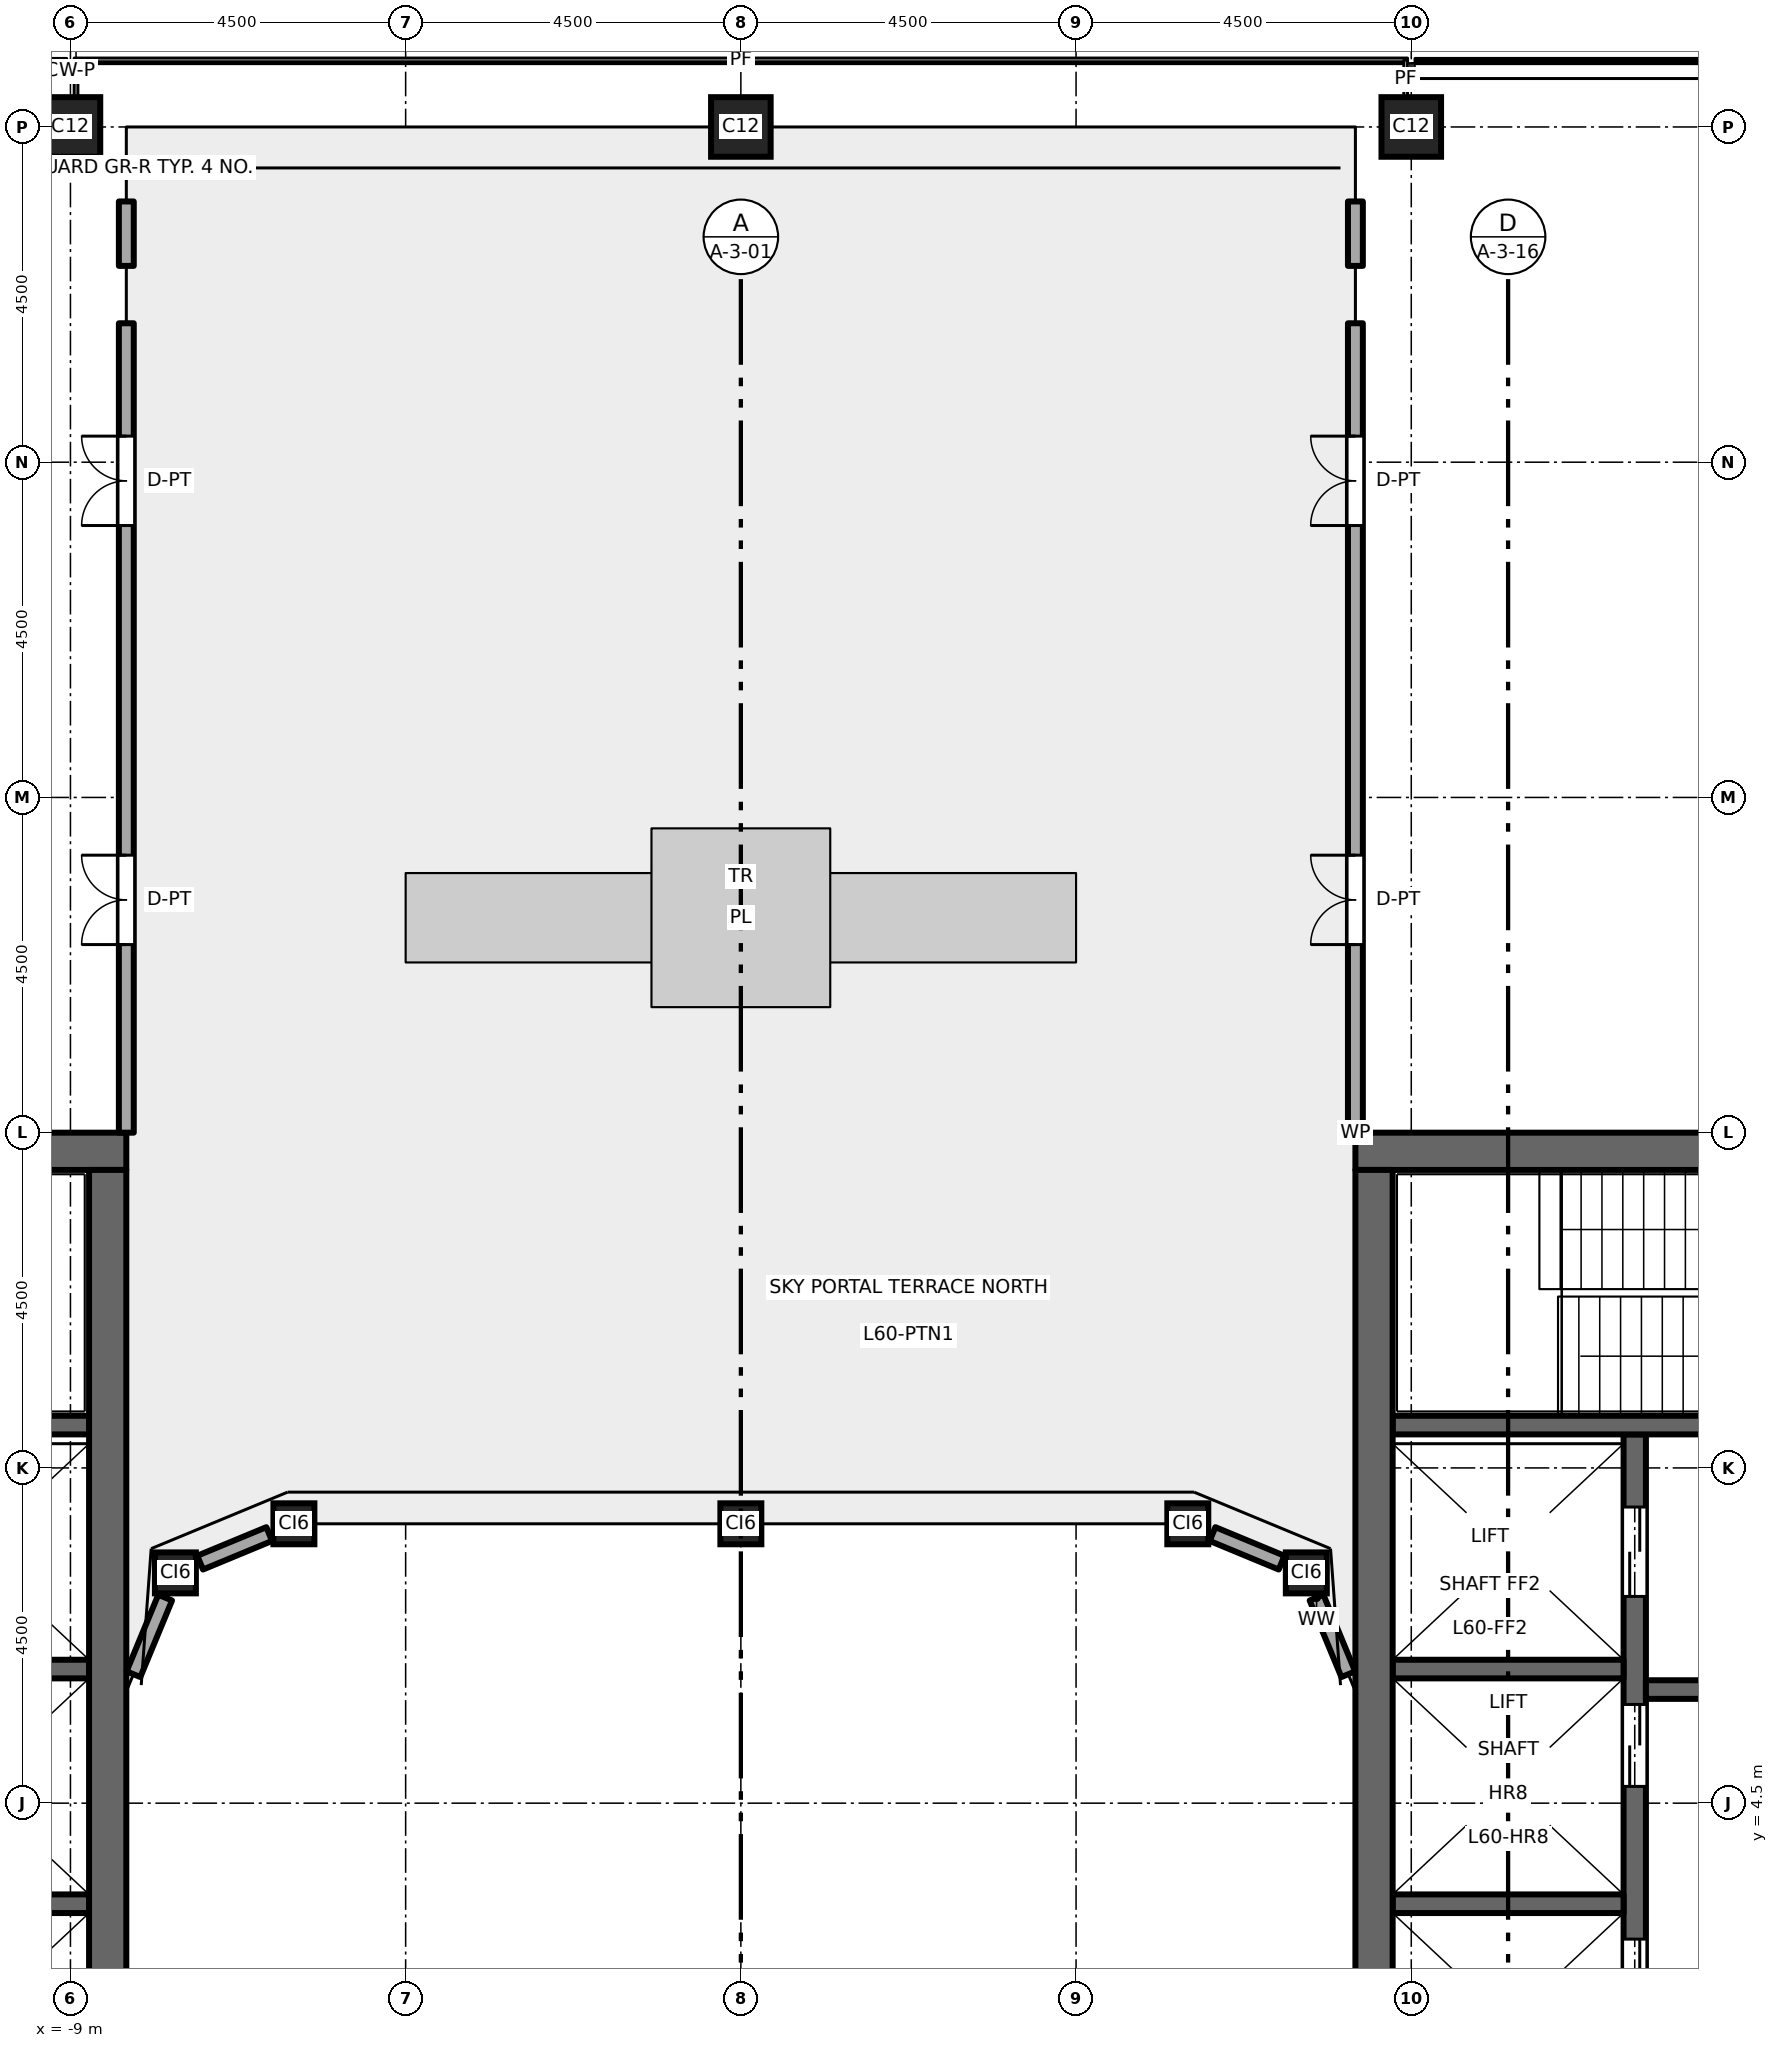
"""IFC4 building model, lengths in metres.
Left out: names, types, materials, properties, quantities, classifications, styles, units other than length and angle.
Written with IfcOpenShell. Run it as: python <this file> out.ifc"""

import sys

from ifc_helpers import new_model, si_unit, direction, frame, frame_2d, origin, origin_2d, place, context, subcontext, project, spatial, rectangle, hollow_rectangle, extrude, element, fill, save


model = new_model("IFC4")
c1 = context("Model", 3, precision=1e-05, world=origin(), true_north=direction((0.0, 1.0)))
c2 = subcontext(c1, "Body", "Model", "MODEL_VIEW")
j1 = project(units=[si_unit("LENGTHUNIT", "METRE"), si_unit("PLANEANGLEUNIT", "RADIAN")], contexts=[c1])
p1 = place(None, origin())
s1 = spatial("IfcSite", under=j1, at=p1, CompositionType="ELEMENT")
p2 = place(p1, origin())
s2 = spatial("IfcBuilding", under=s1, at=p2, CompositionType="ELEMENT")
p3 = place(p2, frame((0.0, 0.0, 278.2)))
s3 = spatial("IfcBuildingStorey", under=s2, at=p3, CompositionType="ELEMENT", Elevation=278.2)
for number, where, z_axis, x_axis in (
    (1, (9.0, 27.0, 0.0), (0.0, 0.0, 1.0), (1.0, 0.0, 0.0)),
    (2, (0.0, 27.0, 0.0), (0.0, 0.0, 1.0), (1.0, 0.0, 0.0)),
    (3, (-9.0, 27.0, 0.0), (0.0, 0.0, 1.0), (1.0, 0.0, 0.0)),
):
    element("IfcColumn", number, at=place(p3, frame(where, z_axis=z_axis, x_axis=x_axis)), inside=s3, PredefinedType="COLUMN", context=c2, shape_type="SweptSolid", body=[
        extrude(hollow_rectangle(XDim=0.8, YDim=0.8, WallThickness=0.045, at=origin_2d()), origin(), (0.0, 0.0, 1.0), 6.0),
    ])
for number, where, z_axis, x_axis in (
    (4, (-7.591, 7.591, 0.0), (0.0, 0.0, 1.0), (1.0, 0.0, 0.0)),
    (5, (-6.0, 8.25, 0.0), (0.0, 0.0, 1.0), (1.0, 0.0, 0.0)),
    (6, (0.0, 8.25, 0.0), (0.0, 0.0, 1.0), (1.0, 0.0, 0.0)),
    (7, (6.0, 8.25, 0.0), (0.0, 0.0, 1.0), (1.0, 0.0, 0.0)),
    (8, (7.591, 7.591, 0.0), (0.0, 0.0, 1.0), (1.0, 0.0, 0.0)),
):
    element("IfcColumn", number, at=place(p3, frame(where, z_axis=z_axis, x_axis=x_axis)), inside=s3, PredefinedType="COLUMN", context=c2, shape_type="SweptSolid", body=[
        extrude(hollow_rectangle(XDim=0.55, YDim=0.55, WallThickness=0.028, at=origin_2d()), origin(), (0.0, 0.0, 1.0), 6.0),
    ])
for number, where, z_axis, x_axis in (
    (9, (-8.75, 3.15, 0.0), (0.0, 0.0, 1.0), (-1.0, 0.0, 0.0)),
    (10, (-8.75, 6.3, 0.0), (0.0, 0.0, 1.0), (-1.0, 0.0, 0.0)),
):
    element("IfcWall", number, at=place(p3, frame(where, z_axis=z_axis, x_axis=x_axis)), inside=s3, PredefinedType="SHEAR", context=c2, shape_type="SweptSolid", body=[
        extrude(rectangle(XDim=3.1, YDim=0.25, at=frame_2d((1.55, 0.0))), origin(), (0.0, 0.0, 1.0), 5.8),
    ])
p4 = place(p3, frame((-8.75, 9.575, 0.0), z_axis=(0.0, 0.0, 1.0), x_axis=(-1.0, 0.0, 0.0)))
e11 = element("IfcWall", 11, at=p4, inside=s3, PredefinedType="SHEAR", context=c2, shape_type="SweptSolid", body=[
    extrude(rectangle(XDim=8.0, YDim=0.25, at=frame_2d((4.0, 0.0))), origin(), (0.0, 0.0, 1.0), 5.8),
])
p5 = place(p4, frame((6.65, 0.0, 0.0)))
e12 = element("IfcOpeningElement", 12, at=p5, cuts=e11, PredefinedType="OPENING", context=c2, shape_type="SweptSolid", body=[
    extrude(rectangle(XDim=1.1, YDim=2.1, at=frame_2d((0.55, 1.05))), frame((0.0, 0.135, 0.0), z_axis=(0.0, -1.0, 0.0), x_axis=(1.0, 0.0, 0.0)), (0.0, 0.0, 1.0), 0.27),
])
p6 = place(p3, frame((-8.25, 13.25, 0.0), z_axis=(0.0, 0.0, 1.0), x_axis=(-1.0, 0.0, 0.0)))
e13 = element("IfcWall", 13, at=p6, inside=s3, PredefinedType="SHEAR", context=c2, shape_type="SweptSolid", body=[
    extrude(rectangle(XDim=13.5, YDim=0.5, at=frame_2d((6.75, 0.0))), origin(), (0.0, 0.0, 1.0), 5.8),
])
p7 = place(p3, frame((-8.5, -13.0, 0.0), z_axis=(0.0, 0.0, 1.0), x_axis=(0.0, 1.0, 0.0)))
e14 = element("IfcWall", 14, at=p7, inside=s3, PredefinedType="SHEAR", context=c2, shape_type="SweptSolid", body=[
    extrude(rectangle(XDim=26.0, YDim=0.5, at=frame_2d((13.0, 0.0))), origin(), (0.0, 0.0, 1.0), 5.8),
])
p8 = place(p3, frame((12.0, -9.45, 0.0), z_axis=(0.0, 0.0, 1.0), x_axis=(0.0, 1.0, 0.0)))
e15 = element("IfcWall", 15, at=p8, inside=s3, PredefinedType="SHEAR", context=c2, shape_type="SweptSolid", body=[
    extrude(rectangle(XDim=18.9, YDim=0.3, at=frame_2d((9.45, 0.0))), origin(), (0.0, 0.0, 1.0), 5.8),
])
p9 = place(p8, frame((4.725, 0.0, 0.0)))
e16 = element("IfcOpeningElement", 16, at=p9, cuts=e15, PredefinedType="OPENING", context=c2, shape_type="SweptSolid", body=[
    extrude(rectangle(XDim=1.1, YDim=2.1, at=frame_2d((0.55, 1.05))), frame((0.0, 0.16, 0.0), z_axis=(0.0, -1.0, 0.0), x_axis=(1.0, 0.0, 0.0)), (0.0, 0.0, 1.0), 0.32),
])
p10 = place(p8, frame((7.875, 0.0, 0.0)))
e17 = element("IfcOpeningElement", 17, at=p10, cuts=e15, PredefinedType="OPENING", context=c2, shape_type="SweptSolid", body=[
    extrude(rectangle(XDim=1.1, YDim=2.1, at=frame_2d((0.55, 1.05))), frame((0.0, 0.16, 0.0), z_axis=(0.0, -1.0, 0.0), x_axis=(1.0, 0.0, 0.0)), (0.0, 0.0, 1.0), 0.32),
])
p11 = place(p8, frame((11.025, 0.0, 0.0)))
e18 = element("IfcOpeningElement", 18, at=p11, cuts=e15, PredefinedType="OPENING", context=c2, shape_type="SweptSolid", body=[
    extrude(rectangle(XDim=1.1, YDim=2.1, at=frame_2d((0.55, 1.05))), frame((0.0, 0.16, 0.0), z_axis=(0.0, -1.0, 0.0), x_axis=(1.0, 0.0, 0.0)), (0.0, 0.0, 1.0), 0.32),
])
p12 = place(p8, frame((14.175, 0.0, 0.0)))
e19 = element("IfcOpeningElement", 19, at=p12, cuts=e15, PredefinedType="OPENING", context=c2, shape_type="SweptSolid", body=[
    extrude(rectangle(XDim=1.1, YDim=2.1, at=frame_2d((0.55, 1.05))), frame((0.0, 0.16, 0.0), z_axis=(0.0, -1.0, 0.0), x_axis=(1.0, 0.0, 0.0)), (0.0, 0.0, 1.0), 0.32),
])
p13 = place(p8, frame((16.725, 0.0, 0.0)))
e20 = element("IfcOpeningElement", 20, at=p13, cuts=e15, PredefinedType="OPENING", context=c2, shape_type="SweptSolid", body=[
    extrude(rectangle(XDim=1.2, YDim=2.1, at=frame_2d((0.6, 1.05))), frame((0.0, 0.16, 0.0), z_axis=(0.0, -1.0, 0.0), x_axis=(1.0, 0.0, 0.0)), (0.0, 0.0, 1.0), 0.32),
])
p14 = place(p8, frame((0.975, 0.0, 0.0)))
e21 = element("IfcOpeningElement", 21, at=p14, cuts=e15, PredefinedType="OPENING", context=c2, shape_type="SweptSolid", body=[
    extrude(rectangle(XDim=1.2, YDim=2.1, at=frame_2d((0.6, 1.05))), frame((0.0, 0.16, 0.0), z_axis=(0.0, -1.0, 0.0), x_axis=(1.0, 0.0, 0.0)), (0.0, 0.0, 1.0), 0.32),
])
p15 = place(p3, frame((12.15, 6.025, 0.0), z_axis=(0.0, 0.0, 1.0), x_axis=(1.0, 0.0, 0.0)))
e22 = element("IfcWall", 22, at=p15, inside=s3, PredefinedType="SHEAR", context=c2, shape_type="SweptSolid", body=[
    extrude(rectangle(XDim=4.6, YDim=0.25, at=frame_2d((2.3, 0.0))), origin(), (0.0, 0.0, 1.0), 5.8),
])
p16 = place(p15, frame((1.8, 0.0, 0.0)))
e23 = element("IfcOpeningElement", 23, at=p16, cuts=e22, PredefinedType="OPENING", context=c2, shape_type="SweptSolid", body=[
    extrude(rectangle(XDim=1.0, YDim=2.1, at=frame_2d((0.5, 1.05))), frame((0.0, 0.135, 0.0), z_axis=(0.0, -1.0, 0.0), x_axis=(1.0, 0.0, 0.0)), (0.0, 0.0, 1.0), 0.27),
])
for number, where, z_axis, x_axis in (
    (24, (8.75, 3.15, 0.0), (0.0, 0.0, 1.0), (1.0, 0.0, 0.0)),
    (25, (8.75, 6.3, 0.0), (0.0, 0.0, 1.0), (1.0, 0.0, 0.0)),
):
    element("IfcWall", number, at=place(p3, frame(where, z_axis=z_axis, x_axis=x_axis)), inside=s3, PredefinedType="SHEAR", context=c2, shape_type="SweptSolid", body=[
        extrude(rectangle(XDim=3.1, YDim=0.25, at=frame_2d((1.55, 0.0))), origin(), (0.0, 0.0, 1.0), 5.8),
    ])
p17 = place(p3, frame((8.75, 9.575, 0.0), z_axis=(0.0, 0.0, 1.0), x_axis=(1.0, 0.0, 0.0)))
e26 = element("IfcWall", 26, at=p17, inside=s3, PredefinedType="SHEAR", context=c2, shape_type="SweptSolid", body=[
    extrude(rectangle(XDim=8.0, YDim=0.25, at=frame_2d((4.0, 0.0))), origin(), (0.0, 0.0, 1.0), 5.8),
])
p18 = place(p17, frame((6.65, 0.0, 0.0)))
e27 = element("IfcOpeningElement", 27, at=p18, cuts=e26, PredefinedType="OPENING", context=c2, shape_type="SweptSolid", body=[
    extrude(rectangle(XDim=1.1, YDim=2.1, at=frame_2d((0.55, 1.05))), frame((0.0, 0.135, 0.0), z_axis=(0.0, -1.0, 0.0), x_axis=(1.0, 0.0, 0.0)), (0.0, 0.0, 1.0), 0.27),
])
p19 = place(p3, frame((8.25, 13.25, 0.0), z_axis=(0.0, 0.0, 1.0), x_axis=(1.0, 0.0, 0.0)))
e28 = element("IfcWall", 28, at=p19, inside=s3, PredefinedType="SHEAR", context=c2, shape_type="SweptSolid", body=[
    extrude(rectangle(XDim=13.5, YDim=0.5, at=frame_2d((6.75, 0.0))), origin(), (0.0, 0.0, 1.0), 5.8),
])
p20 = place(p3, frame((8.5, -13.0, 0.0), z_axis=(0.0, 0.0, 1.0), x_axis=(0.0, 1.0, 0.0)))
e29 = element("IfcWall", 29, at=p20, inside=s3, PredefinedType="SHEAR", context=c2, shape_type="SweptSolid", body=[
    extrude(rectangle(XDim=26.0, YDim=0.5, at=frame_2d((13.0, 0.0))), origin(), (0.0, 0.0, 1.0), 5.8),
])
p21 = place(p3, frame((8.154, 6.231, 0.0), z_axis=(0.0, 0.0, 1.0), x_axis=(-0.382635994082, 0.923899180665, 0.0)))
e30 = element("IfcWall", 30, at=p21, inside=s3, PredefinedType="STANDARD", context=c2, shape_type="SweptSolid", body=[
    extrude(rectangle(XDim=1.113, YDim=0.2, at=frame_2d((0.556, 0.0))), origin(), (0.0, 0.0, 1.0), 5.46),
])
for number, where, z_axis, x_axis in (
    (31, (7.259, 7.729, 0.0), (0.0, 0.0, 1.0), (-0.924, 0.383, 0.0)),
    (32, (-6.332, 8.113, 0.0), (0.0, 0.0, 1.0), (-0.924, -0.383, 0.0)),
):
    element("IfcWall", number, at=place(p3, frame(where, z_axis=z_axis, x_axis=x_axis)), inside=s3, PredefinedType="STANDARD", context=c2, shape_type="SweptSolid", body=[
        extrude(rectangle(XDim=1.003, YDim=0.2, at=frame_2d((0.502, 0.0))), origin(), (0.0, 0.0, 1.0), 5.46),
    ])
p22 = place(p3, frame((-7.729, 7.259, 0.0), z_axis=(0.0, 0.0, 1.0), x_axis=(-0.382635994082, -0.923899180665, 0.0)))
e33 = element("IfcWall", 33, at=p22, inside=s3, PredefinedType="STANDARD", context=c2, shape_type="SweptSolid", body=[
    extrude(rectangle(XDim=1.113, YDim=0.2, at=frame_2d((0.556, 0.0))), origin(), (0.0, 0.0, 1.0), 5.46),
])
p23 = place(p3, frame((-8.25, 13.5, 0.0), z_axis=(0.0, 0.0, 1.0), x_axis=(0.0, 1.0, 0.0)))
e34 = element("IfcWall", 34, at=p23, inside=s3, PredefinedType="STANDARD", context=c2, shape_type="SweptSolid", body=[
    extrude(rectangle(XDim=10.865, YDim=0.2, at=frame_2d((5.433, 0.0))), origin(), (0.0, 0.0, 1.0), 5.8),
])
p24 = place(p23, frame((2.525, 0.0, 0.0)))
e35 = element("IfcOpeningElement", 35, at=p24, cuts=e34, PredefinedType="OPENING", context=c2, shape_type="SweptSolid", body=[
    extrude(rectangle(XDim=1.2, YDim=2.4, at=frame_2d((0.6, 1.2))), frame((0.0, 0.11, 0.0), z_axis=(0.0, -1.0, 0.0), x_axis=(1.0, 0.0, 0.0)), (0.0, 0.0, 1.0), 0.22),
])
p25 = place(p23, frame((8.15, 0.0, 0.0)))
e36 = element("IfcOpeningElement", 36, at=p25, cuts=e34, PredefinedType="OPENING", context=c2, shape_type="SweptSolid", body=[
    extrude(rectangle(XDim=1.2, YDim=2.4, at=frame_2d((0.6, 1.2))), frame((0.0, 0.11, 0.0), z_axis=(0.0, -1.0, 0.0), x_axis=(1.0, 0.0, 0.0)), (0.0, 0.0, 1.0), 0.22),
])
p26 = place(p3, frame((-8.25, 25.135, 0.0), z_axis=(0.0, 0.0, 1.0), x_axis=(0.0, 1.0, 0.0)))
e37 = element("IfcWall", 37, at=p26, inside=s3, PredefinedType="STANDARD", context=c2, shape_type="SweptSolid", body=[
    extrude(rectangle(XDim=0.865, YDim=0.2, at=frame_2d((0.433, 0.0))), origin(), (0.0, 0.0, 1.0), 5.8),
])
p27 = place(p3, frame((8.25, 13.5, 0.0), z_axis=(0.0, 0.0, 1.0), x_axis=(0.0, 1.0, 0.0)))
e38 = element("IfcWall", 38, at=p27, inside=s3, PredefinedType="STANDARD", context=c2, shape_type="SweptSolid", body=[
    extrude(rectangle(XDim=10.865, YDim=0.2, at=frame_2d((5.433, 0.0))), origin(), (0.0, 0.0, 1.0), 5.8),
])
p28 = place(p27, frame((2.525, 0.0, 0.0)))
e39 = element("IfcOpeningElement", 39, at=p28, cuts=e38, PredefinedType="OPENING", context=c2, shape_type="SweptSolid", body=[
    extrude(rectangle(XDim=1.2, YDim=2.4, at=frame_2d((0.6, 1.2))), frame((0.0, 0.11, 0.0), z_axis=(0.0, -1.0, 0.0), x_axis=(1.0, 0.0, 0.0)), (0.0, 0.0, 1.0), 0.22),
])
p29 = place(p27, frame((8.15, 0.0, 0.0)))
e40 = element("IfcOpeningElement", 40, at=p29, cuts=e38, PredefinedType="OPENING", context=c2, shape_type="SweptSolid", body=[
    extrude(rectangle(XDim=1.2, YDim=2.4, at=frame_2d((0.6, 1.2))), frame((0.0, 0.11, 0.0), z_axis=(0.0, -1.0, 0.0), x_axis=(1.0, 0.0, 0.0)), (0.0, 0.0, 1.0), 0.22),
])
p30 = place(p3, frame((8.25, 25.135, 0.0), z_axis=(0.0, 0.0, 1.0), x_axis=(0.0, 1.0, 0.0)))
e41 = element("IfcWall", 41, at=p30, inside=s3, PredefinedType="STANDARD", context=c2, shape_type="SweptSolid", body=[
    extrude(rectangle(XDim=0.865, YDim=0.2, at=frame_2d((0.433, 0.0))), origin(), (0.0, 0.0, 1.0), 5.8),
])
p31 = place(p11, origin())
e42 = element("IfcDoor", 42, at=p31, inside=s3, OperationType="DOUBLE_DOOR_SLIDING", PredefinedType="DOOR", context=c2, shape_type="SweptSolid", body=[
    extrude(rectangle(XDim=1.1, YDim=2.1, at=frame_2d((0.55, 1.05))), frame((0.0, 0.025, 0.0), z_axis=(0.0, -1.0, 0.0), x_axis=(1.0, 0.0, 0.0)), (0.0, 0.0, 1.0), 0.05),
])
fill(e18, e42)
p32 = place(p12, origin())
e43 = element("IfcDoor", 43, at=p32, inside=s3, OperationType="DOUBLE_DOOR_SLIDING", PredefinedType="DOOR", context=c2, shape_type="SweptSolid", body=[
    extrude(rectangle(XDim=1.1, YDim=2.1, at=frame_2d((0.55, 1.05))), frame((0.0, 0.025, 0.0), z_axis=(0.0, -1.0, 0.0), x_axis=(1.0, 0.0, 0.0)), (0.0, 0.0, 1.0), 0.05),
])
fill(e19, e43)
p33 = place(p13, origin())
e44 = element("IfcDoor", 44, at=p33, inside=s3, OperationType="DOUBLE_DOOR_SLIDING", PredefinedType="DOOR", context=c2, shape_type="SweptSolid", body=[
    extrude(rectangle(XDim=1.2, YDim=2.1, at=frame_2d((0.6, 1.05))), frame((0.0, 0.025, 0.0), z_axis=(0.0, -1.0, 0.0), x_axis=(1.0, 0.0, 0.0)), (0.0, 0.0, 1.0), 0.05),
])
fill(e20, e44)
p34 = place(p24, origin())
e45 = element("IfcDoor", 45, at=p34, inside=s3, OperationType="DOUBLE_DOOR_SINGLE_SWING", PredefinedType="DOOR", context=c2, shape_type="SweptSolid", body=[
    extrude(rectangle(XDim=1.2, YDim=2.4, at=frame_2d((0.6, 1.2))), frame((0.0, 0.025, 0.0), z_axis=(0.0, -1.0, 0.0), x_axis=(1.0, 0.0, 0.0)), (0.0, 0.0, 1.0), 0.05),
])
fill(e35, e45)
p35 = place(p25, origin())
e46 = element("IfcDoor", 46, at=p35, inside=s3, OperationType="DOUBLE_DOOR_SINGLE_SWING", PredefinedType="DOOR", context=c2, shape_type="SweptSolid", body=[
    extrude(rectangle(XDim=1.2, YDim=2.4, at=frame_2d((0.6, 1.2))), frame((0.0, 0.025, 0.0), z_axis=(0.0, -1.0, 0.0), x_axis=(1.0, 0.0, 0.0)), (0.0, 0.0, 1.0), 0.05),
])
fill(e36, e46)
p36 = place(p28, origin())
e47 = element("IfcDoor", 47, at=p36, inside=s3, OperationType="DOUBLE_DOOR_SINGLE_SWING", PredefinedType="DOOR", context=c2, shape_type="SweptSolid", body=[
    extrude(rectangle(XDim=1.2, YDim=2.4, at=frame_2d((0.6, 1.2))), frame((0.0, 0.025, 0.0), z_axis=(0.0, -1.0, 0.0), x_axis=(1.0, 0.0, 0.0)), (0.0, 0.0, 1.0), 0.05),
])
fill(e39, e47)
p37 = place(p29, origin())
e48 = element("IfcDoor", 48, at=p37, inside=s3, OperationType="DOUBLE_DOOR_SINGLE_SWING", PredefinedType="DOOR", context=c2, shape_type="SweptSolid", body=[
    extrude(rectangle(XDim=1.2, YDim=2.4, at=frame_2d((0.6, 1.2))), frame((0.0, 0.025, 0.0), z_axis=(0.0, -1.0, 0.0), x_axis=(1.0, 0.0, 0.0)), (0.0, 0.0, 1.0), 0.05),
])
fill(e40, e48)
save(model, sys.argv[1])
